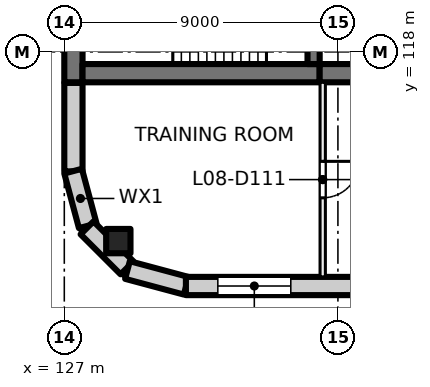
"""IFC4 building model, lengths in metres.
Left out: names, types, materials, properties, quantities, classifications, styles, units other than length and angle.
Written with IfcOpenShell. Run it as: python <this file> out.ifc"""

import sys

from ifc_helpers import new_model, si_unit, direction, frame, frame_2d, origin, origin_2d, place, context, subcontext, project, spatial, rectangle, extrude, element, fill, save


model = new_model("IFC4")
c1 = context("Model", 3, precision=1e-05, world=origin(), true_north=direction((0.0, 1.0)))
c2 = subcontext(c1, "Body", "Model", "MODEL_VIEW")
j1 = project(units=[si_unit("LENGTHUNIT", "METRE"), si_unit("PLANEANGLEUNIT", "RADIAN")], contexts=[c1])
p1 = place(None, origin())
s1 = spatial("IfcSite", under=j1, at=p1, CompositionType="ELEMENT")
p2 = place(p1, origin())
s2 = spatial("IfcBuilding", under=s1, at=p2, CompositionType="ELEMENT")
p3 = place(p2, frame((0.0, 0.0, 39.5)))
s3 = spatial("IfcBuildingStorey", under=s2, at=p3, CompositionType="ELEMENT", Elevation=39.5)
p4 = place(p3, frame((128.777, 111.777, 0.0), z_axis=(0.0, 0.0, 1.0), x_axis=(1.0, 0.0, 0.0)))
e1 = element("IfcColumn", 1, at=p4, inside=s3, PredefinedType="COLUMN", context=c2, shape_type="SweptSolid", body=[
    extrude(rectangle(XDim=0.8, YDim=0.8, at=origin_2d()), origin(), (0.0, 0.0, 1.0), 4.0),
])
p5 = place(p3, frame((127.3, 117.0, 0.0), z_axis=(0.0, 0.0, 1.0), x_axis=(0.0, 1.0, 0.0)))
e2 = element("IfcWall", 2, at=p5, inside=s3, PredefinedType="SHEAR", context=c2, shape_type="SweptSolid", body=[
    extrude(rectangle(XDim=3.8, YDim=0.6, at=frame_2d((1.9, 0.0))), origin(), (0.0, 0.0, 1.0), 4.0),
])
p6 = place(p3, frame((127.6, 117.3, 0.0), z_axis=(0.0, 0.0, 1.0), x_axis=(1.0, 0.0, 0.0)))
e3 = element("IfcWall", 3, at=p6, inside=s3, PredefinedType="SHEAR", context=c2, shape_type="SweptSolid", body=[
    extrude(rectangle(XDim=7.8, YDim=0.6, at=frame_2d((3.9, 0.0))), origin(), (0.0, 0.0, 1.0), 4.0),
])
p7 = place(p3, frame((135.4, 117.3, 0.0), z_axis=(0.0, 0.0, 1.0), x_axis=(1.0, 0.0, 0.0)))
e4 = element("IfcWall", 4, at=p7, inside=s3, PredefinedType="SHEAR", context=c2, shape_type="SweptSolid", body=[
    extrude(rectangle(XDim=4.6, YDim=0.6, at=frame_2d((2.3, 0.0))), origin(), (0.0, 0.0, 1.0), 4.0),
])
p8 = place(p3, frame((135.2, 117.6, 0.0), z_axis=(0.0, 0.0, 1.0), x_axis=(0.0, 1.0, 0.0)))
e5 = element("IfcWall", 5, at=p8, inside=s3, PredefinedType="SHEAR", context=c2, shape_type="SweptSolid", body=[
    extrude(rectangle(XDim=2.8, YDim=0.4, at=frame_2d((1.4, 0.0))), origin(), (0.0, 0.0, 1.0), 4.0),
])
p9 = place(p8, frame((0.9, 0.0, 0.0)))
e6 = element("IfcOpeningElement", 6, at=p9, cuts=e5, PredefinedType="OPENING", context=c2, shape_type="SweptSolid", body=[
    extrude(rectangle(XDim=1.0, YDim=2.1, at=frame_2d((0.5, 1.05))), frame((0.0, 0.21, 0.0), z_axis=(0.0, -1.0, 0.0), x_axis=(1.0, 0.0, 0.0)), (0.0, 0.0, 1.0), 0.42),
])
p10 = place(p3, frame((127.3, 114.07, 0.0), z_axis=(0.0, 0.0, 1.0), x_axis=(0.0, 1.0, 0.0)))
e7 = element("IfcWall", 7, at=p10, inside=s3, PredefinedType="SOLIDWALL", context=c2, shape_type="SweptSolid", body=[
    extrude(rectangle(XDim=2.91, YDim=0.6, at=frame_2d((1.455, 0.0))), origin(), (0.0, 0.0, 1.0), 3.625),
])
for number, where, z_axis, x_axis in (
    (8, (127.771, 112.281, 0.0), (0.0, 0.0, 1.0), (-0.259, 0.966, 0.0)),
    (9, (129.064, 110.896, 0.0), (0.0, 0.0, 1.0), (-0.707, 0.707, 0.0)),
):
    element("IfcWall", number, at=place(p3, frame(where, z_axis=z_axis, x_axis=x_axis)), inside=s3, PredefinedType="SOLIDWALL", context=c2, shape_type="SweptSolid", body=[
        extrude(rectangle(XDim=1.861, YDim=0.6, at=frame_2d((0.93, 0.0))), origin(), (0.0, 0.0, 1.0), 3.625),
    ])
p11 = place(p3, frame((131.01, 110.308, 0.0), z_axis=(0.0, 0.0, 1.0), x_axis=(-0.965920269068, 0.258839784042, 0.0)))
e10 = element("IfcWall", 10, at=p11, inside=s3, PredefinedType="SOLIDWALL", context=c2, shape_type="SweptSolid", body=[
    extrude(rectangle(XDim=2.0, YDim=0.6, at=frame_2d((1.0, 0.0))), origin(), (0.0, 0.0, 1.0), 3.625),
])
p12 = place(p3, frame((162.93, 110.3, 0.0), z_axis=(0.0, 0.0, 1.0), x_axis=(-1.0, 0.0, 0.0)))
e11 = element("IfcWall", 11, at=p12, inside=s3, PredefinedType="SOLIDWALL", context=c2, shape_type="SweptSolid", body=[
    extrude(rectangle(XDim=31.93, YDim=0.6, at=frame_2d((15.965, 0.0))), origin(), (0.0, 0.0, 1.0), 3.625),
])
p13 = place(p12, frame((1.48, 0.0, 0.9)))
e12 = element("IfcOpeningElement", 12, at=p13, cuts=e11, PredefinedType="OPENING", context=c2, shape_type="SweptSolid", body=[
    extrude(rectangle(XDim=2.4, YDim=2.4, at=frame_2d((1.2, 1.2))), frame((0.0, 0.31, 0.0), z_axis=(0.0, -1.0, 0.0), x_axis=(1.0, 0.0, 0.0)), (0.0, 0.0, 1.0), 0.62),
])
p14 = place(p12, frame((5.98, 0.0, 0.9)))
e13 = element("IfcOpeningElement", 13, at=p14, cuts=e11, PredefinedType="OPENING", context=c2, shape_type="SweptSolid", body=[
    extrude(rectangle(XDim=2.4, YDim=2.4, at=frame_2d((1.2, 1.2))), frame((0.0, 0.31, 0.0), z_axis=(0.0, -1.0, 0.0), x_axis=(1.0, 0.0, 0.0)), (0.0, 0.0, 1.0), 0.62),
])
p15 = place(p12, frame((10.48, 0.0, 0.9)))
e14 = element("IfcOpeningElement", 14, at=p15, cuts=e11, PredefinedType="OPENING", context=c2, shape_type="SweptSolid", body=[
    extrude(rectangle(XDim=2.4, YDim=2.4, at=frame_2d((1.2, 1.2))), frame((0.0, 0.31, 0.0), z_axis=(0.0, -1.0, 0.0), x_axis=(1.0, 0.0, 0.0)), (0.0, 0.0, 1.0), 0.62),
])
p16 = place(p12, frame((14.98, 0.0, 0.9)))
e15 = element("IfcOpeningElement", 15, at=p16, cuts=e11, PredefinedType="OPENING", context=c2, shape_type="SweptSolid", body=[
    extrude(rectangle(XDim=2.4, YDim=2.4, at=frame_2d((1.2, 1.2))), frame((0.0, 0.31, 0.0), z_axis=(0.0, -1.0, 0.0), x_axis=(1.0, 0.0, 0.0)), (0.0, 0.0, 1.0), 0.62),
])
p17 = place(p12, frame((19.48, 0.0, 0.9)))
e16 = element("IfcOpeningElement", 16, at=p17, cuts=e11, PredefinedType="OPENING", context=c2, shape_type="SweptSolid", body=[
    extrude(rectangle(XDim=2.4, YDim=2.4, at=frame_2d((1.2, 1.2))), frame((0.0, 0.31, 0.0), z_axis=(0.0, -1.0, 0.0), x_axis=(1.0, 0.0, 0.0)), (0.0, 0.0, 1.0), 0.62),
])
p18 = place(p12, frame((23.98, 0.0, 0.9)))
e17 = element("IfcOpeningElement", 17, at=p18, cuts=e11, PredefinedType="OPENING", context=c2, shape_type="SweptSolid", body=[
    extrude(rectangle(XDim=2.4, YDim=2.4, at=frame_2d((1.2, 1.2))), frame((0.0, 0.31, 0.0), z_axis=(0.0, -1.0, 0.0), x_axis=(1.0, 0.0, 0.0)), (0.0, 0.0, 1.0), 0.62),
])
p19 = place(p12, frame((28.48, 0.0, 0.9)))
e18 = element("IfcOpeningElement", 18, at=p19, cuts=e11, PredefinedType="OPENING", context=c2, shape_type="SweptSolid", body=[
    extrude(rectangle(XDim=2.4, YDim=2.4, at=frame_2d((1.2, 1.2))), frame((0.0, 0.31, 0.0), z_axis=(0.0, -1.0, 0.0), x_axis=(1.0, 0.0, 0.0)), (0.0, 0.0, 1.0), 0.62),
])
p20 = place(p3, frame((135.5, 117.0, 0.0), z_axis=(0.0, 0.0, 1.0), x_axis=(0.0, -1.0, 0.0)))
e19 = element("IfcWall", 19, at=p20, inside=s3, PredefinedType="PARTITIONING", context=c2, shape_type="SweptSolid", body=[
    extrude(rectangle(XDim=6.4, YDim=0.175, at=frame_2d((3.2, 0.0))), origin(), (0.0, 0.0, 1.0), 3.625),
])
p21 = place(p20, frame((2.6, 0.0, 0.0)))
e20 = element("IfcOpeningElement", 20, at=p21, cuts=e19, PredefinedType="OPENING", context=c2, shape_type="SweptSolid", body=[
    extrude(rectangle(XDim=1.2, YDim=2.1, at=frame_2d((0.6, 1.05))), frame((0.0, 0.097, 0.0), z_axis=(0.0, -1.0, 0.0), x_axis=(1.0, 0.0, 0.0)), (0.0, 0.0, 1.0), 0.195),
])
p22 = place(p19, origin())
e21 = element("IfcWindow", 21, at=p22, inside=s3, PartitioningType="SINGLE_PANEL", PredefinedType="WINDOW", context=c2, shape_type="SweptSolid", body=[
    extrude(rectangle(XDim=2.4, YDim=2.4, at=frame_2d((1.2, 1.2))), frame((0.0, 0.03, 0.0), z_axis=(0.0, -1.0, 0.0), x_axis=(1.0, 0.0, 0.0)), (0.0, 0.0, 1.0), 0.06),
])
fill(e18, e21)
p23 = place(p21, origin())
e22 = element("IfcDoor", 22, at=p23, inside=s3, OperationType="DOUBLE_DOOR_SINGLE_SWING", PredefinedType="DOOR", context=c2, shape_type="SweptSolid", body=[
    extrude(rectangle(XDim=1.2, YDim=2.1, at=frame_2d((0.6, 1.05))), frame((0.0, 0.025, 0.0), z_axis=(0.0, -1.0, 0.0), x_axis=(1.0, 0.0, 0.0)), (0.0, 0.0, 1.0), 0.05),
])
fill(e20, e22)
save(model, sys.argv[1])
